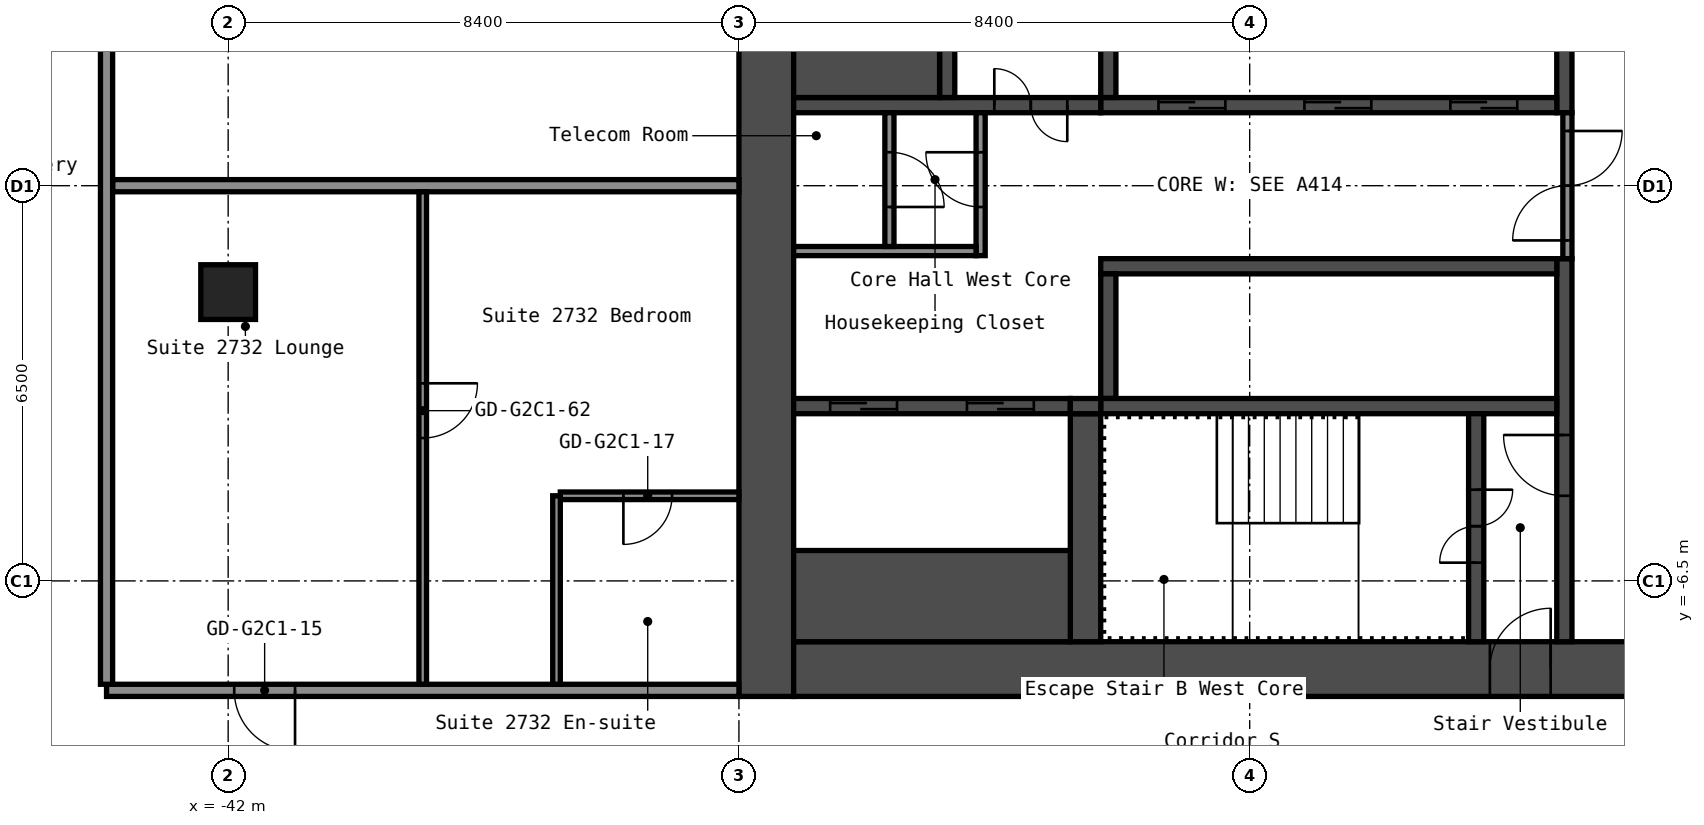
"""IFC4 building model, lengths in metres.
Left out: names, types, materials, properties, quantities, classifications, styles, units other than length and angle.
Written with IfcOpenShell. Run it as: python <this file> out.ifc"""

import sys

from ifc_helpers import new_model, si_unit, direction, frame, frame_2d, origin, origin_2d, place, context, subcontext, project, spatial, rectangle, hollow_rectangle, extrude, element, fill, save


model = new_model("IFC4")
c1 = context("Model", 3, precision=1e-05, world=origin(), true_north=direction((0.0, 1.0)))
c2 = subcontext(c1, "Body", "Model", "MODEL_VIEW")
j1 = project(units=[si_unit("LENGTHUNIT", "METRE"), si_unit("PLANEANGLEUNIT", "RADIAN")], contexts=[c1])
p1 = place(None, origin())
s1 = spatial("IfcSite", under=j1, at=p1, CompositionType="ELEMENT")
p2 = place(p1, origin())
s2 = spatial("IfcBuilding", under=s1, at=p2, CompositionType="ELEMENT")
p3 = place(p2, frame((0.0, 0.0, 97.8)))
s3 = spatial("IfcBuildingStorey", under=s2, at=p3, CompositionType="ELEMENT", Elevation=97.8)
p4 = place(p3, frame((-42.0, -1.75, 0.0), z_axis=(0.0, 0.0, 1.0), x_axis=(1.0, 0.0, 0.0)))
e1 = element("IfcColumn", 1, at=p4, inside=s3, PredefinedType="COLUMN", context=c2, shape_type="SweptSolid", body=[
    extrude(hollow_rectangle(XDim=0.9, YDim=0.9, WallThickness=0.036, at=origin_2d()), origin(), (0.0, 0.0, 1.0), 2.8),
])
p5 = place(p3, frame((-33.15, -8.4, 0.0), z_axis=(0.0, 0.0, 1.0), x_axis=(0.0, 1.0, 0.0)))
e2 = element("IfcWall", 2, at=p5, inside=s3, PredefinedType="SHEAR", context=c2, shape_type="SweptSolid", body=[
    extrude(rectangle(XDim=16.8, YDim=0.9, at=frame_2d((8.4, 0.0))), origin(), (0.0, 0.0, 1.0), 2.8),
])
p6 = place(p3, frame((-32.7, -7.95, 0.0), z_axis=(0.0, 0.0, 1.0), x_axis=(1.0, 0.0, 0.0)))
e3 = element("IfcWall", 3, at=p6, inside=s3, PredefinedType="SHEAR", context=c2, shape_type="SweptSolid", body=[
    extrude(rectangle(XDim=15.0, YDim=0.9, at=frame_2d((7.5, 0.0))), origin(), (0.0, 0.0, 1.0), 2.8),
])
p7 = place(p6, frame((11.45, 0.0, 0.0)))
e4 = element("IfcOpeningElement", 4, at=p7, cuts=e3, PredefinedType="OPENING", context=c2, shape_type="SweptSolid", body=[
    extrude(rectangle(XDim=1.0, YDim=2.1, at=frame_2d((0.5, 1.05))), frame((0.0, 0.46, 0.0), z_axis=(0.0, -1.0, 0.0), x_axis=(1.0, 0.0, 0.0)), (0.0, 0.0, 1.0), 0.92),
])
p8 = place(p3, frame((-20.025, 1.2, 0.0), z_axis=(0.0, 0.0, 1.0), x_axis=(0.0, 1.0, 0.0)))
e5 = element("IfcWall", 5, at=p8, inside=s3, PredefinedType="SHEAR", context=c2, shape_type="SweptSolid", body=[
    extrude(rectangle(XDim=6.3, YDim=0.25, at=frame_2d((3.15, 0.0))), origin(), (0.0, 0.0, 1.0), 2.8),
])
p9 = place(p3, frame((-20.025, -7.5, 0.0), z_axis=(0.0, 0.0, 1.0), x_axis=(0.0, 1.0, 0.0)))
e6 = element("IfcWall", 6, at=p9, inside=s3, PredefinedType="SHEAR", context=c2, shape_type="SweptSolid", body=[
    extrude(rectangle(XDim=6.3, YDim=0.25, at=frame_2d((3.15, 0.0))), origin(), (0.0, 0.0, 1.0), 2.8),
])
p10 = place(p9, frame((2.4, 0.0, 0.0)))
e7 = element("IfcOpeningElement", 7, at=p10, cuts=e6, PredefinedType="OPENING", context=c2, shape_type="SweptSolid", body=[
    extrude(rectangle(XDim=1.0, YDim=2.1, at=frame_2d((0.5, 1.05))), frame((0.0, 0.135, 0.0), z_axis=(0.0, -1.0, 0.0), x_axis=(1.0, 0.0, 0.0)), (0.0, 0.0, 1.0), 0.27),
])
p11 = place(p3, frame((-27.65, 1.325, 0.0), z_axis=(0.0, 0.0, 1.0), x_axis=(1.0, 0.0, 0.0)))
e8 = element("IfcWall", 8, at=p11, inside=s3, PredefinedType="SHEAR", context=c2, shape_type="SweptSolid", body=[
    extrude(rectangle(XDim=7.5, YDim=0.25, at=frame_2d((3.75, 0.0))), origin(), (0.0, 0.0, 1.0), 2.8),
])
p12 = place(p11, frame((5.75, 0.0, 0.0)))
e9 = element("IfcOpeningElement", 9, at=p12, cuts=e8, PredefinedType="OPENING", context=c2, shape_type="SweptSolid", body=[
    extrude(rectangle(XDim=1.1, YDim=2.1, at=frame_2d((0.55, 1.05))), frame((0.0, 0.135, 0.0), z_axis=(0.0, -1.0, 0.0), x_axis=(1.0, 0.0, 0.0)), (0.0, 0.0, 1.0), 0.27),
])
p13 = place(p11, frame((3.35, 0.0, 0.0)))
e10 = element("IfcOpeningElement", 10, at=p13, cuts=e8, PredefinedType="OPENING", context=c2, shape_type="SweptSolid", body=[
    extrude(rectangle(XDim=1.1, YDim=2.1, at=frame_2d((0.55, 1.05))), frame((0.0, 0.135, 0.0), z_axis=(0.0, -1.0, 0.0), x_axis=(1.0, 0.0, 0.0)), (0.0, 0.0, 1.0), 0.27),
])
p14 = place(p11, frame((0.95, 0.0, 0.0)))
e11 = element("IfcOpeningElement", 11, at=p14, cuts=e8, PredefinedType="OPENING", context=c2, shape_type="SweptSolid", body=[
    extrude(rectangle(XDim=1.1, YDim=2.1, at=frame_2d((0.55, 1.05))), frame((0.0, 0.135, 0.0), z_axis=(0.0, -1.0, 0.0), x_axis=(1.0, 0.0, 0.0)), (0.0, 0.0, 1.0), 0.27),
])
p15 = place(p3, frame((-27.525, 1.45, 0.0), z_axis=(0.0, 0.0, 1.0), x_axis=(0.0, 1.0, 0.0)))
e12 = element("IfcWall", 12, at=p15, inside=s3, PredefinedType="SHEAR", context=c2, shape_type="SweptSolid", body=[
    extrude(rectangle(XDim=2.05, YDim=0.25, at=frame_2d((1.025, 0.0))), origin(), (0.0, 0.0, 1.0), 2.8),
])
p16 = place(p3, frame((-32.7, 1.325, 0.0), z_axis=(0.0, 0.0, 1.0), x_axis=(1.0, 0.0, 0.0)))
e13 = element("IfcWall", 13, at=p16, inside=s3, PredefinedType="SHEAR", context=c2, shape_type="SweptSolid", body=[
    extrude(rectangle(XDim=5.05, YDim=0.25, at=frame_2d((2.525, 0.0))), origin(), (0.0, 0.0, 1.0), 2.8),
])
p17 = place(p16, frame((3.3, 0.0, 0.0)))
e14 = element("IfcOpeningElement", 14, at=p17, cuts=e13, PredefinedType="OPENING", context=c2, shape_type="SweptSolid", body=[
    extrude(rectangle(XDim=1.2, YDim=2.1, at=frame_2d((0.6, 1.05))), frame((0.0, 0.135, 0.0), z_axis=(0.0, -1.0, 0.0), x_axis=(1.0, 0.0, 0.0)), (0.0, 0.0, 1.0), 0.27),
])
p18 = place(p3, frame((-30.175, 1.45, 0.0), z_axis=(0.0, 0.0, 1.0), x_axis=(0.0, 1.0, 0.0)))
e15 = element("IfcWall", 15, at=p18, inside=s3, PredefinedType="SHEAR", context=c2, shape_type="SweptSolid", body=[
    extrude(rectangle(XDim=6.05, YDim=0.25, at=frame_2d((3.025, 0.0))), origin(), (0.0, 0.0, 1.0), 2.8),
])
p19 = place(p18, frame((2.625, 0.0, 0.0)))
e16 = element("IfcOpeningElement", 16, at=p19, cuts=e15, PredefinedType="OPENING", context=c2, shape_type="SweptSolid", body=[
    extrude(rectangle(XDim=1.1, YDim=2.1, at=frame_2d((0.55, 1.05))), frame((0.0, 0.135, 0.0), z_axis=(0.0, -1.0, 0.0), x_axis=(1.0, 0.0, 0.0)), (0.0, 0.0, 1.0), 0.27),
])
p20 = place(p3, frame((-32.7, 2.375, 0.0), z_axis=(0.0, 0.0, 1.0), x_axis=(1.0, 0.0, 0.0)))
e17 = element("IfcWall", 17, at=p20, inside=s3, PredefinedType="SHEAR", context=c2, shape_type="SweptSolid", body=[
    extrude(rectangle(XDim=2.4, YDim=1.85, at=frame_2d((1.2, 0.0))), origin(), (0.0, 0.0, 1.0), 2.8),
])
p21 = place(p3, frame((-27.65, -1.325, 0.0), z_axis=(0.0, 0.0, 1.0), x_axis=(1.0, 0.0, 0.0)))
e18 = element("IfcWall", 18, at=p21, inside=s3, PredefinedType="SHEAR", context=c2, shape_type="SweptSolid", body=[
    extrude(rectangle(XDim=7.5, YDim=0.25, at=frame_2d((3.75, 0.0))), origin(), (0.0, 0.0, 1.0), 2.8),
])
p22 = place(p3, frame((-27.525, -3.5, 0.0), z_axis=(0.0, 0.0, 1.0), x_axis=(0.0, 1.0, 0.0)))
e19 = element("IfcWall", 19, at=p22, inside=s3, PredefinedType="SHEAR", context=c2, shape_type="SweptSolid", body=[
    extrude(rectangle(XDim=2.05, YDim=0.25, at=frame_2d((1.025, 0.0))), origin(), (0.0, 0.0, 1.0), 2.8),
])
p23 = place(p3, frame((-27.65, -3.625, 0.0), z_axis=(0.0, 0.0, 1.0), x_axis=(1.0, 0.0, 0.0)))
e20 = element("IfcWall", 20, at=p23, inside=s3, PredefinedType="SHEAR", context=c2, shape_type="SweptSolid", body=[
    extrude(rectangle(XDim=7.5, YDim=0.25, at=frame_2d((3.75, 0.0))), origin(), (0.0, 0.0, 1.0), 2.8),
])
p24 = place(p3, frame((-21.475, -7.5, 0.0), z_axis=(0.0, 0.0, 1.0), x_axis=(0.0, 1.0, 0.0)))
e21 = element("IfcWall", 21, at=p24, inside=s3, PredefinedType="SHEAR", context=c2, shape_type="SweptSolid", body=[
    extrude(rectangle(XDim=3.75, YDim=0.25, at=frame_2d((1.875, 0.0))), origin(), (0.0, 0.0, 1.0), 2.8),
])
p25 = place(p24, frame((1.3, 0.0, 0.0)))
e22 = element("IfcOpeningElement", 22, at=p25, cuts=e21, PredefinedType="OPENING", context=c2, shape_type="SweptSolid", body=[
    extrude(rectangle(XDim=1.2, YDim=2.1, at=frame_2d((0.6, 1.05))), frame((0.0, 0.135, 0.0), z_axis=(0.0, -1.0, 0.0), x_axis=(1.0, 0.0, 0.0)), (0.0, 0.0, 1.0), 0.27),
])
p26 = place(p3, frame((-27.9, -7.5, 0.0), z_axis=(0.0, 0.0, 1.0), x_axis=(0.0, 1.0, 0.0)))
e23 = element("IfcWall", 23, at=p26, inside=s3, PredefinedType="SHEAR", context=c2, shape_type="SweptSolid", body=[
    extrude(rectangle(XDim=3.75, YDim=0.5, at=frame_2d((1.875, 0.0))), origin(), (0.0, 0.0, 1.0), 2.8),
])
p27 = place(p3, frame((-32.7, -3.625, 0.0), z_axis=(0.0, 0.0, 1.0), x_axis=(1.0, 0.0, 0.0)))
e24 = element("IfcWall", 24, at=p27, inside=s3, PredefinedType="SHEAR", context=c2, shape_type="SweptSolid", body=[
    extrude(rectangle(XDim=4.55, YDim=0.25, at=frame_2d((2.275, 0.0))), origin(), (0.0, 0.0, 1.0), 2.8),
])
p28 = place(p27, frame((2.85, 0.0, 0.0)))
e25 = element("IfcOpeningElement", 25, at=p28, cuts=e24, PredefinedType="OPENING", context=c2, shape_type="SweptSolid", body=[
    extrude(rectangle(XDim=1.1, YDim=2.1, at=frame_2d((0.55, 1.05))), frame((0.0, 0.135, 0.0), z_axis=(0.0, -1.0, 0.0), x_axis=(1.0, 0.0, 0.0)), (0.0, 0.0, 1.0), 0.27),
])
p29 = place(p27, frame((0.6, 0.0, 0.0)))
e26 = element("IfcOpeningElement", 26, at=p29, cuts=e24, PredefinedType="OPENING", context=c2, shape_type="SweptSolid", body=[
    extrude(rectangle(XDim=1.1, YDim=2.1, at=frame_2d((0.55, 1.05))), frame((0.0, 0.135, 0.0), z_axis=(0.0, -1.0, 0.0), x_axis=(1.0, 0.0, 0.0)), (0.0, 0.0, 1.0), 0.27),
])
p30 = place(p3, frame((-32.7, -6.75, 0.0), z_axis=(0.0, 0.0, 1.0), x_axis=(1.0, 0.0, 0.0)))
e27 = element("IfcWall", 27, at=p30, inside=s3, PredefinedType="SHEAR", context=c2, shape_type="SweptSolid", body=[
    extrude(rectangle(XDim=4.55, YDim=1.5, at=frame_2d((2.275, 0.0))), origin(), (0.0, 0.0, 1.0), 2.8),
])
p31 = place(p3, frame((-28.15, -3.625, 0.0), z_axis=(0.0, 0.0, 1.0), x_axis=(1.0, 0.0, 0.0)))
e28 = element("IfcWall", 28, at=p31, inside=s3, PredefinedType="SHEAR", context=c2, shape_type="SweptSolid", body=[
    extrude(rectangle(XDim=0.5, YDim=0.25, at=frame_2d((0.25, 0.0))), origin(), (0.0, 0.0, 1.0), 2.8),
])
p32 = place(p3, frame((-19.975, -1.2, 0.0), z_axis=(0.0, 0.0, 1.0), x_axis=(0.0, 1.0, 0.0)))
e29 = element("IfcWall", 29, at=p32, inside=s3, PredefinedType="PARTITIONING", context=c2, shape_type="SweptSolid", body=[
    extrude(rectangle(XDim=2.4, YDim=0.15, at=frame_2d((1.2, 0.0))), origin(), (0.0, 0.0, 1.0), 2.8),
])
p33 = place(p32, frame((0.3, 0.0, 0.0)))
e30 = element("IfcOpeningElement", 30, at=p33, cuts=e29, PredefinedType="OPENING", context=c2, shape_type="SweptSolid", body=[
    extrude(rectangle(XDim=1.8, YDim=2.1, at=frame_2d((0.9, 1.05))), frame((0.0, 0.085, 0.0), z_axis=(0.0, -1.0, 0.0), x_axis=(1.0, 0.0, 0.0)), (0.0, 0.0, 1.0), 0.17),
])
p34 = place(p3, frame((-29.625, -1.15, 0.0), z_axis=(0.0, 0.0, 1.0), x_axis=(0.0, 1.0, 0.0)))
e31 = element("IfcWall", 31, at=p34, inside=s3, PredefinedType="PARTITIONING", context=c2, shape_type="SweptSolid", body=[
    extrude(rectangle(XDim=2.35, YDim=0.15, at=frame_2d((1.175, 0.0))), origin(), (0.0, 0.0, 1.0), 2.8),
])
p35 = place(p34, frame((0.8, 0.0, 0.0)))
e32 = element("IfcOpeningElement", 32, at=p35, cuts=e31, PredefinedType="OPENING", context=c2, shape_type="SweptSolid", body=[
    extrude(rectangle(XDim=0.9, YDim=2.1, at=frame_2d((0.45, 1.05))), frame((0.0, 0.085, 0.0), z_axis=(0.0, -1.0, 0.0), x_axis=(1.0, 0.0, 0.0)), (0.0, 0.0, 1.0), 0.17),
])
p36 = place(p3, frame((-32.7, -1.075, 0.0), z_axis=(0.0, 0.0, 1.0), x_axis=(1.0, 0.0, 0.0)))
e33 = element("IfcWall", 33, at=p36, inside=s3, PredefinedType="PARTITIONING", context=c2, shape_type="SweptSolid", body=[
    extrude(rectangle(XDim=3.0, YDim=0.15, at=frame_2d((1.5, 0.0))), origin(), (0.0, 0.0, 1.0), 2.8),
])
p37 = place(p3, frame((-31.125, -1.0, 0.0), z_axis=(0.0, 0.0, 1.0), x_axis=(0.0, 1.0, 0.0)))
e34 = element("IfcWall", 34, at=p37, inside=s3, PredefinedType="PARTITIONING", context=c2, shape_type="SweptSolid", body=[
    extrude(rectangle(XDim=2.2, YDim=0.15, at=frame_2d((1.1, 0.0))), origin(), (0.0, 0.0, 1.0), 2.8),
])
p38 = place(p37, frame((0.65, 0.0, 0.0)))
e35 = element("IfcOpeningElement", 35, at=p38, cuts=e34, PredefinedType="OPENING", context=c2, shape_type="SweptSolid", body=[
    extrude(rectangle(XDim=0.9, YDim=2.1, at=frame_2d((0.45, 1.05))), frame((0.0, 0.085, 0.0), z_axis=(0.0, -1.0, 0.0), x_axis=(1.0, 0.0, 0.0)), (0.0, 0.0, 1.0), 0.17),
])
p39 = place(p3, frame((-44.0, -8.3, 0.0), z_axis=(0.0, 0.0, 1.0), x_axis=(1.0, 0.0, 0.0)))
e36 = element("IfcWall", 36, at=p39, inside=s3, PredefinedType="PARTITIONING", context=c2, shape_type="SweptSolid", body=[
    extrude(rectangle(XDim=10.4, YDim=0.2, at=frame_2d((5.2, 0.0))), origin(), (0.0, 0.0, 1.0), 2.8),
])
p40 = place(p39, frame((2.1, 0.0, 0.0)))
e37 = element("IfcOpeningElement", 37, at=p40, cuts=e36, PredefinedType="OPENING", context=c2, shape_type="SweptSolid", body=[
    extrude(rectangle(XDim=1.0, YDim=2.1, at=frame_2d((0.5, 1.05))), frame((0.0, 0.11, 0.0), z_axis=(0.0, -1.0, 0.0), x_axis=(1.0, 0.0, 0.0)), (0.0, 0.0, 1.0), 0.22),
])
p41 = place(p3, frame((-36.538, -5.1, 0.0), z_axis=(0.0, 0.0, 1.0), x_axis=(1.0, 0.0, 0.0)))
e38 = element("IfcWall", 38, at=p41, inside=s3, PredefinedType="PARTITIONING", context=c2, shape_type="SweptSolid", body=[
    extrude(rectangle(XDim=2.938, YDim=0.125, at=frame_2d((1.469, 0.0))), origin(), (0.0, 0.0, 1.0), 2.8),
])
p42 = place(p41, frame((1.038, 0.0, 0.0)))
e39 = element("IfcOpeningElement", 39, at=p42, cuts=e38, PredefinedType="OPENING", context=c2, shape_type="SweptSolid", body=[
    extrude(rectangle(XDim=0.8, YDim=2.1, at=frame_2d((0.4, 1.05))), frame((0.0, 0.073, 0.0), z_axis=(0.0, -1.0, 0.0), x_axis=(1.0, 0.0, 0.0)), (0.0, 0.0, 1.0), 0.145),
])
p43 = place(p3, frame((-43.9, 0.0, 0.0), z_axis=(0.0, 0.0, 1.0), x_axis=(1.0, 0.0, 0.0)))
e40 = element("IfcWall", 40, at=p43, inside=s3, PredefinedType="PARTITIONING", context=c2, shape_type="SweptSolid", body=[
    extrude(rectangle(XDim=10.3, YDim=0.2, at=frame_2d((5.15, 0.0))), origin(), (0.0, 0.0, 1.0), 2.8),
])
p44 = place(p3, frame((-44.0, -8.2, 0.0), z_axis=(0.0, 0.0, 1.0), x_axis=(0.0, 1.0, 0.0)))
e41 = element("IfcWall", 41, at=p44, inside=s3, PredefinedType="PARTITIONING", context=c2, shape_type="SweptSolid", body=[
    extrude(rectangle(XDim=16.4, YDim=0.2, at=frame_2d((8.2, 0.0))), origin(), (0.0, 0.0, 1.0), 2.8),
])
p45 = place(p3, frame((-38.8, -8.2, 0.0), z_axis=(0.0, 0.0, 1.0), x_axis=(0.0, 1.0, 0.0)))
e42 = element("IfcWall", 42, at=p45, inside=s3, PredefinedType="PARTITIONING", context=c2, shape_type="SweptSolid", body=[
    extrude(rectangle(XDim=8.1, YDim=0.125, at=frame_2d((4.05, 0.0))), origin(), (0.0, 0.0, 1.0), 2.8),
])
p46 = place(p45, frame((4.05, 0.0, 0.0)))
e43 = element("IfcOpeningElement", 43, at=p46, cuts=e42, PredefinedType="OPENING", context=c2, shape_type="SweptSolid", body=[
    extrude(rectangle(XDim=0.9, YDim=2.1, at=frame_2d((0.45, 1.05))), frame((0.0, 0.073, 0.0), z_axis=(0.0, -1.0, 0.0), x_axis=(1.0, 0.0, 0.0)), (0.0, 0.0, 1.0), 0.145),
])
p47 = place(p3, frame((-36.6, -8.2, 0.0), z_axis=(0.0, 0.0, 1.0), x_axis=(0.0, 1.0, 0.0)))
e44 = element("IfcWall", 44, at=p47, inside=s3, PredefinedType="PARTITIONING", context=c2, shape_type="SweptSolid", body=[
    extrude(rectangle(XDim=3.1, YDim=0.125, at=frame_2d((1.55, 0.0))), origin(), (0.0, 0.0, 1.0), 2.8),
])
p48 = place(p7, origin())
e45 = element("IfcDoor", 45, at=p48, inside=s3, OperationType="SINGLE_SWING_LEFT", PredefinedType="DOOR", context=c2, shape_type="SweptSolid", body=[
    extrude(rectangle(XDim=1.0, YDim=2.1, at=frame_2d((0.5, 1.05))), frame((0.0, 0.025, 0.0), z_axis=(0.0, -1.0, 0.0), x_axis=(1.0, 0.0, 0.0)), (0.0, 0.0, 1.0), 0.05),
])
fill(e4, e45)
p49 = place(p25, origin())
e46 = element("IfcDoor", 46, at=p49, inside=s3, OperationType="DOUBLE_DOOR_SINGLE_SWING", PredefinedType="DOOR", context=c2, shape_type="SweptSolid", body=[
    extrude(rectangle(XDim=1.2, YDim=2.1, at=frame_2d((0.6, 1.05))), frame((0.0, 0.025, 0.0), z_axis=(0.0, -1.0, 0.0), x_axis=(1.0, 0.0, 0.0)), (0.0, 0.0, 1.0), 0.05),
])
fill(e22, e46)
p50 = place(p10, origin())
e47 = element("IfcDoor", 47, at=p50, inside=s3, OperationType="SINGLE_SWING_LEFT", PredefinedType="DOOR", context=c2, shape_type="SweptSolid", body=[
    extrude(rectangle(XDim=1.0, YDim=2.1, at=frame_2d((0.5, 1.05))), frame((0.0, 0.025, 0.0), z_axis=(0.0, -1.0, 0.0), x_axis=(1.0, 0.0, 0.0)), (0.0, 0.0, 1.0), 0.05),
])
fill(e7, e47)
p51 = place(p17, origin())
e48 = element("IfcDoor", 48, at=p51, inside=s3, OperationType="DOUBLE_DOOR_SINGLE_SWING", PredefinedType="DOOR", context=c2, shape_type="SweptSolid", body=[
    extrude(rectangle(XDim=1.2, YDim=2.1, at=frame_2d((0.6, 1.05))), frame((0.0, 0.025, 0.0), z_axis=(0.0, -1.0, 0.0), x_axis=(1.0, 0.0, 0.0)), (0.0, 0.0, 1.0), 0.05),
])
fill(e14, e48)
p52 = place(p33, origin())
e49 = element("IfcDoor", 49, at=p52, inside=s3, OperationType="DOUBLE_DOOR_SINGLE_SWING", PredefinedType="DOOR", context=c2, shape_type="SweptSolid", body=[
    extrude(rectangle(XDim=1.8, YDim=2.1, at=frame_2d((0.9, 1.05))), frame((0.0, 0.025, 0.0), z_axis=(0.0, -1.0, 0.0), x_axis=(1.0, 0.0, 0.0)), (0.0, 0.0, 1.0), 0.05),
])
fill(e30, e49)
p53 = place(p35, origin())
e50 = element("IfcDoor", 50, at=p53, inside=s3, OperationType="SINGLE_SWING_LEFT", PredefinedType="DOOR", context=c2, shape_type="SweptSolid", body=[
    extrude(rectangle(XDim=0.9, YDim=2.1, at=frame_2d((0.45, 1.05))), frame((0.0, 0.025, 0.0), z_axis=(0.0, -1.0, 0.0), x_axis=(1.0, 0.0, 0.0)), (0.0, 0.0, 1.0), 0.05),
])
fill(e32, e50)
p54 = place(p38, origin())
e51 = element("IfcDoor", 51, at=p54, inside=s3, OperationType="SINGLE_SWING_LEFT", PredefinedType="DOOR", context=c2, shape_type="SweptSolid", body=[
    extrude(rectangle(XDim=0.9, YDim=2.1, at=frame_2d((0.45, 1.05))), frame((0.0, 0.025, 0.0), z_axis=(0.0, -1.0, 0.0), x_axis=(1.0, 0.0, 0.0)), (0.0, 0.0, 1.0), 0.05),
])
fill(e35, e51)
p55 = place(p12, origin())
e52 = element("IfcDoor", 52, at=p55, inside=s3, OperationType="DOUBLE_DOOR_SLIDING", PredefinedType="DOOR", context=c2, shape_type="SweptSolid", body=[
    extrude(rectangle(XDim=1.1, YDim=2.1, at=frame_2d((0.55, 1.05))), frame((0.0, 0.025, 0.0), z_axis=(0.0, -1.0, 0.0), x_axis=(1.0, 0.0, 0.0)), (0.0, 0.0, 1.0), 0.05),
])
fill(e9, e52)
p56 = place(p13, origin())
e53 = element("IfcDoor", 53, at=p56, inside=s3, OperationType="DOUBLE_DOOR_SLIDING", PredefinedType="DOOR", context=c2, shape_type="SweptSolid", body=[
    extrude(rectangle(XDim=1.1, YDim=2.1, at=frame_2d((0.55, 1.05))), frame((0.0, 0.025, 0.0), z_axis=(0.0, -1.0, 0.0), x_axis=(1.0, 0.0, 0.0)), (0.0, 0.0, 1.0), 0.05),
])
fill(e10, e53)
p57 = place(p14, origin())
e54 = element("IfcDoor", 54, at=p57, inside=s3, OperationType="DOUBLE_DOOR_SLIDING", PredefinedType="DOOR", context=c2, shape_type="SweptSolid", body=[
    extrude(rectangle(XDim=1.1, YDim=2.1, at=frame_2d((0.55, 1.05))), frame((0.0, 0.025, 0.0), z_axis=(0.0, -1.0, 0.0), x_axis=(1.0, 0.0, 0.0)), (0.0, 0.0, 1.0), 0.05),
])
fill(e11, e54)
p58 = place(p28, origin())
e55 = element("IfcDoor", 55, at=p58, inside=s3, OperationType="DOUBLE_DOOR_SLIDING", PredefinedType="DOOR", context=c2, shape_type="SweptSolid", body=[
    extrude(rectangle(XDim=1.1, YDim=2.1, at=frame_2d((0.55, 1.05))), frame((0.0, 0.025, 0.0), z_axis=(0.0, -1.0, 0.0), x_axis=(1.0, 0.0, 0.0)), (0.0, 0.0, 1.0), 0.05),
])
fill(e25, e55)
p59 = place(p29, origin())
e56 = element("IfcDoor", 56, at=p59, inside=s3, OperationType="DOUBLE_DOOR_SLIDING", PredefinedType="DOOR", context=c2, shape_type="SweptSolid", body=[
    extrude(rectangle(XDim=1.1, YDim=2.1, at=frame_2d((0.55, 1.05))), frame((0.0, 0.025, 0.0), z_axis=(0.0, -1.0, 0.0), x_axis=(1.0, 0.0, 0.0)), (0.0, 0.0, 1.0), 0.05),
])
fill(e26, e56)
p60 = place(p40, origin())
e57 = element("IfcDoor", 57, at=p60, inside=s3, OperationType="SINGLE_SWING_RIGHT", PredefinedType="DOOR", context=c2, shape_type="SweptSolid", body=[
    extrude(rectangle(XDim=1.0, YDim=2.1, at=frame_2d((0.5, 1.05))), frame((0.0, 0.025, 0.0), z_axis=(0.0, -1.0, 0.0), x_axis=(1.0, 0.0, 0.0)), (0.0, 0.0, 1.0), 0.05),
])
fill(e37, e57)
p61 = place(p42, origin())
e58 = element("IfcDoor", 58, at=p61, inside=s3, OperationType="SINGLE_SWING_LEFT", PredefinedType="DOOR", context=c2, shape_type="SweptSolid", body=[
    extrude(rectangle(XDim=0.8, YDim=2.1, at=frame_2d((0.4, 1.05))), frame((0.0, 0.025, 0.0), z_axis=(0.0, -1.0, 0.0), x_axis=(1.0, 0.0, 0.0)), (0.0, 0.0, 1.0), 0.05),
])
fill(e39, e58)
p62 = place(p46, origin())
e59 = element("IfcDoor", 59, at=p62, inside=s3, OperationType="SINGLE_SWING_RIGHT", PredefinedType="DOOR", context=c2, shape_type="SweptSolid", body=[
    extrude(rectangle(XDim=0.9, YDim=2.1, at=frame_2d((0.45, 1.05))), frame((0.0, 0.025, 0.0), z_axis=(0.0, -1.0, 0.0), x_axis=(1.0, 0.0, 0.0)), (0.0, 0.0, 1.0), 0.05),
])
fill(e43, e59)
save(model, sys.argv[1])
